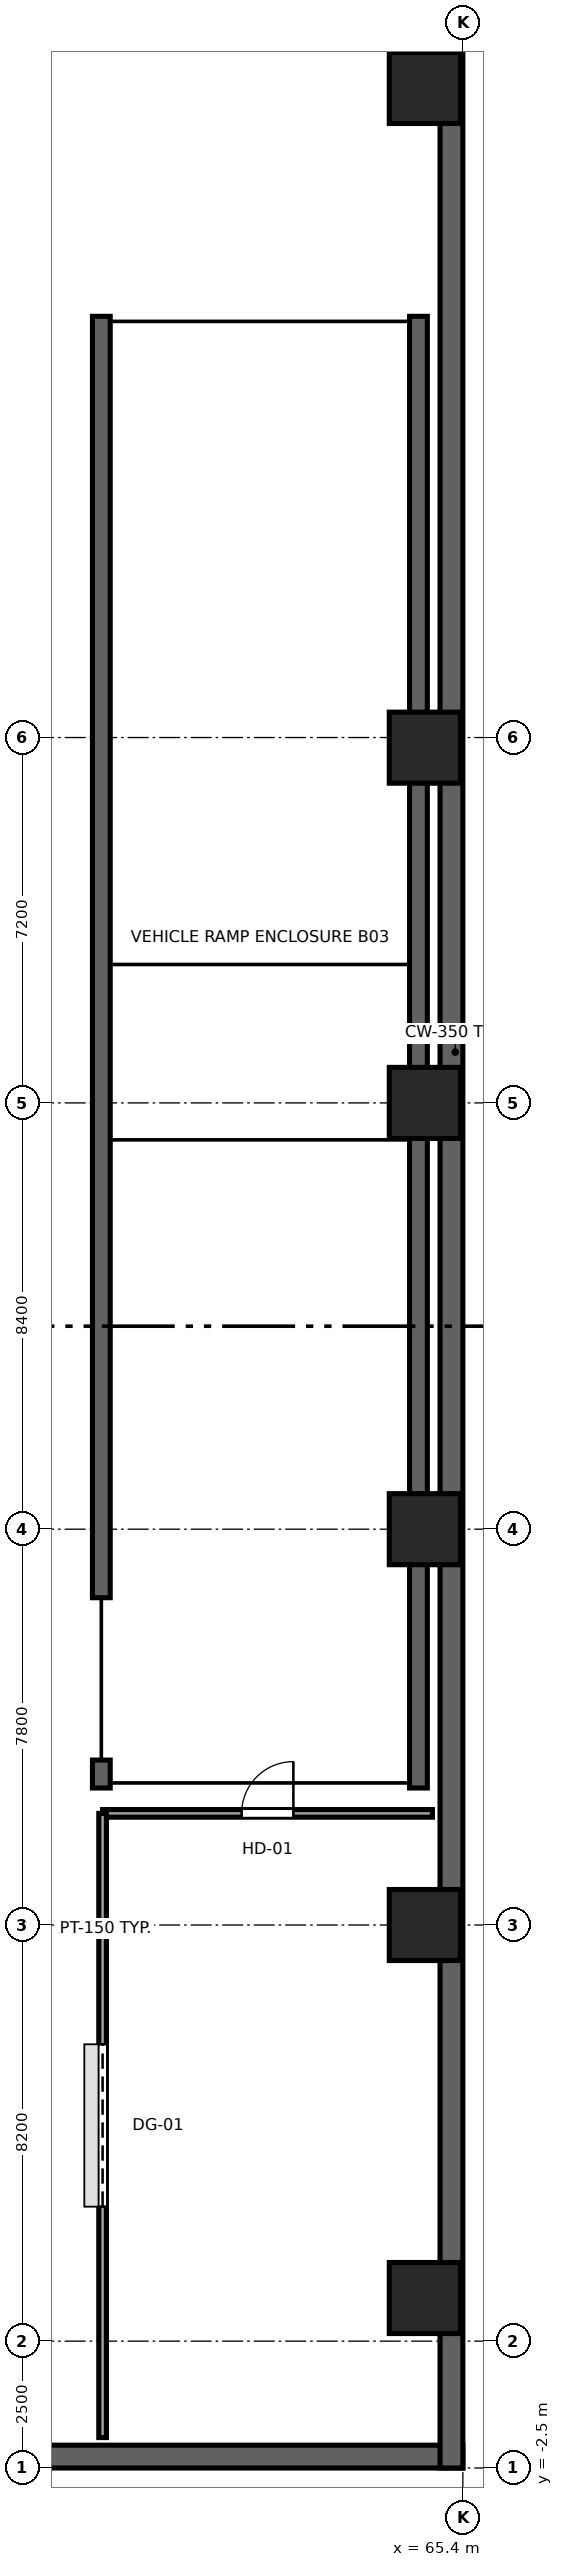
"""IFC4 building model, lengths in metres.
Left out: names, types, materials, properties, quantities, classifications, styles, units other than length and angle.
Written with IfcOpenShell. Run it as: python <this file> out.ifc"""

import sys

from ifc_helpers import new_model, si_unit, direction, frame, frame_2d, origin, origin_2d, place, context, subcontext, project, spatial, rectangle, extrude, source, transform, mapped, element, fill, save


model = new_model("IFC4")
c1 = context("Model", 3, precision=1e-05, world=origin(), true_north=direction((0.0, 1.0)))
c2 = subcontext(c1, "Body", "Model", "MODEL_VIEW")
j1 = project(units=[si_unit("LENGTHUNIT", "METRE"), si_unit("PLANEANGLEUNIT", "RADIAN")], contexts=[c1])
p1 = place(None, origin())
s1 = spatial("IfcSite", under=j1, at=p1, CompositionType="ELEMENT")
p2 = place(p1, origin())
s2 = spatial("IfcBuilding", under=s1, at=p2, CompositionType="ELEMENT")
p3 = place(p2, frame((0.0, 0.0, -14.4)))
s3 = spatial("IfcBuildingStorey", under=s2, at=p3, CompositionType="ELEMENT", Elevation=-14.4)
p4 = place(p3, frame((58.275, 10.9, 0.0), z_axis=(0.0, 0.0, 1.0), x_axis=(0.0, 1.0, 0.0)))
e1 = element("IfcWall", 1, at=p4, inside=s3, PredefinedType="SHEAR", context=c2, shape_type="SweptSolid", body=[
    extrude(rectangle(XDim=0.55, YDim=0.35, at=frame_2d((0.275, 0.0))), origin(), (0.0, 0.0, 1.0), 4.8),
])
p5 = place(p3, frame((58.275, 14.65, 0.0), z_axis=(0.0, 0.0, 1.0), x_axis=(0.0, 1.0, 0.0)))
e2 = element("IfcWall", 2, at=p5, inside=s3, PredefinedType="SHEAR", context=c2, shape_type="SweptSolid", body=[
    extrude(rectangle(XDim=25.25, YDim=0.35, at=frame_2d((12.625, 0.0))), origin(), (0.0, 0.0, 1.0), 4.8),
])
p6 = place(p3, frame((64.525, 10.9, 0.0), z_axis=(0.0, 0.0, 1.0), x_axis=(0.0, 1.0, 0.0)))
e3 = element("IfcWall", 3, at=p6, inside=s3, PredefinedType="SHEAR", context=c2, shape_type="SweptSolid", body=[
    extrude(rectangle(XDim=29.0, YDim=0.35, at=frame_2d((14.5, 0.0))), origin(), (0.0, 0.0, 1.0), 4.8),
])
p7 = place(p3, frame((-8.4, -2.275, 0.0), z_axis=(0.0, 0.0, 1.0), x_axis=(1.0, 0.0, 0.0)))
e4 = element("IfcWall", 4, at=p7, inside=s3, PredefinedType="SOLIDWALL", context=c2, shape_type="SweptSolid", body=[
    extrude(rectangle(XDim=73.8, YDim=0.45, at=frame_2d((36.9, 0.0))), origin(), (0.0, 0.0, 1.0), 4.8),
])
p8 = place(p3, frame((65.175, -2.5, 0.0), z_axis=(0.0, 0.0, 1.0), x_axis=(0.0, 1.0, 0.0)))
e5 = element("IfcWall", 5, at=p8, inside=s3, PredefinedType="SOLIDWALL", context=c2, shape_type="SweptSolid", body=[
    extrude(rectangle(XDim=51.0, YDim=0.45, at=frame_2d((25.5, 0.0))), origin(), (0.0, 0.0, 1.0), 4.8),
])
m1 = source(origin(), c2, "Body", "SweptSolid", [
    extrude(rectangle(XDim=1.4, YDim=1.4, at=origin_2d()), origin(), (0.0, 0.0, 1.0), 5.2),
])
for number, where, z_axis, x_axis in (
    (6, (64.65, 0.85, -0.4), (0.0, 0.0, 1.0), (1.0, 0.0, 0.0)),
    (7, (64.65, 8.2, -0.4), (0.0, 0.0, 1.0), (1.0, 0.0, 0.0)),
    (8, (64.65, 16.0, -0.4), (0.0, 0.0, 1.0), (1.0, 0.0, 0.0)),
    (9, (64.65, 24.4, -0.4), (0.0, 0.0, 1.0), (1.0, 0.0, 0.0)),
    (10, (64.65, 31.4, -0.4), (0.0, 0.0, 1.0), (1.0, 0.0, 0.0)),
    (11, (64.65, 44.4, -0.4), (0.0, 0.0, 1.0), (1.0, 0.0, 0.0)),
):
    element("IfcColumn", number, at=place(p3, frame(where, z_axis=z_axis, x_axis=x_axis)), inside=s3, PredefinedType="COLUMN", context=c2, shape_type="MappedRepresentation", body=[
        mapped(m1, transform((0.0, 0.0, 0.0), x_axis=(1.0, 0.0, 0.0), y_axis=(0.0, 1.0, 0.0), z_axis=(0.0, 0.0, 1.0), scale=1.0)),
    ])
p9 = place(p3, frame((58.3, 10.4, 0.0), z_axis=(0.0, 0.0, 1.0), x_axis=(1.0, 0.0, 0.0)))
e12 = element("IfcWall", 12, at=p9, inside=s3, PredefinedType="PARTITIONING", context=c2, shape_type="SweptSolid", body=[
    extrude(rectangle(XDim=6.5, YDim=0.15, at=frame_2d((3.25, 0.0))), origin(), (0.0, 0.0, 1.0), 4.54),
])
p10 = place(p9, frame((2.74, 0.0, 0.0)))
e13 = element("IfcOpeningElement", 13, at=p10, cuts=e12, PredefinedType="OPENING", context=c2, shape_type="SweptSolid", body=[
    extrude(rectangle(XDim=1.02, YDim=2.03, at=frame_2d((0.51, 1.015))), frame((0.0, 0.085, 0.0), z_axis=(0.0, -1.0, 0.0), x_axis=(1.0, 0.0, 0.0)), (0.0, 0.0, 1.0), 0.17),
])
p11 = place(p3, frame((58.3, -1.9, 0.0), z_axis=(0.0, 0.0, 1.0), x_axis=(0.0, 1.0, 0.0)))
e14 = element("IfcWall", 14, at=p11, inside=s3, PredefinedType="PARTITIONING", context=c2, shape_type="SweptSolid", body=[
    extrude(rectangle(XDim=12.3, YDim=0.15, at=frame_2d((6.15, 0.0))), origin(), (0.0, 0.0, 1.0), 4.54),
])
p12 = place(p11, frame((4.55, 0.0, 0.0)))
e15 = element("IfcOpeningElement", 15, at=p12, cuts=e14, PredefinedType="OPENING", context=c2, shape_type="SweptSolid", body=[
    extrude(rectangle(XDim=3.2, YDim=2.8, at=frame_2d((1.6, 1.4))), frame((0.0, 0.085, 0.0), z_axis=(0.0, -1.0, 0.0), x_axis=(1.0, 0.0, 0.0)), (0.0, 0.0, 1.0), 0.17),
])
m2 = source(origin(), c2, "Body", "SweptSolid", [
    extrude(rectangle(XDim=1.02, YDim=2.03, at=frame_2d((0.51, 1.015))), frame((0.0, 0.025, 0.0), z_axis=(0.0, -1.0, 0.0), x_axis=(1.0, 0.0, 0.0)), (0.0, 0.0, 1.0), 0.05),
])
p13 = place(p10, origin())
e16 = element("IfcDoor", 16, at=p13, inside=s3, OperationType="SINGLE_SWING_RIGHT", PredefinedType="DOOR", context=c2, shape_type="MappedRepresentation", body=[
    mapped(m2, transform((0.0, 0.0, 0.0), x_axis=(1.0, 0.0, 0.0), y_axis=(0.0, 1.0, 0.0), z_axis=(0.0, 0.0, 1.0), scale=1.0)),
])
fill(e13, e16)
m3 = source(origin(), c2, "Body", "SweptSolid", [
    extrude(rectangle(XDim=3.2, YDim=2.8, at=frame_2d((1.6, 1.4))), frame((0.0, 0.025, 0.0), z_axis=(0.0, -1.0, 0.0), x_axis=(1.0, 0.0, 0.0)), (0.0, 0.0, 1.0), 0.05),
])
p14 = place(p12, origin())
e17 = element("IfcDoor", 17, at=p14, inside=s3, OperationType="ROLLINGUP", PredefinedType="GATE", context=c2, shape_type="MappedRepresentation", body=[
    mapped(m3, transform((0.0, 0.0, 0.0), x_axis=(1.0, 0.0, 0.0), y_axis=(0.0, 1.0, 0.0), z_axis=(0.0, 0.0, 1.0), scale=1.0)),
])
fill(e15, e17)
save(model, sys.argv[1])
